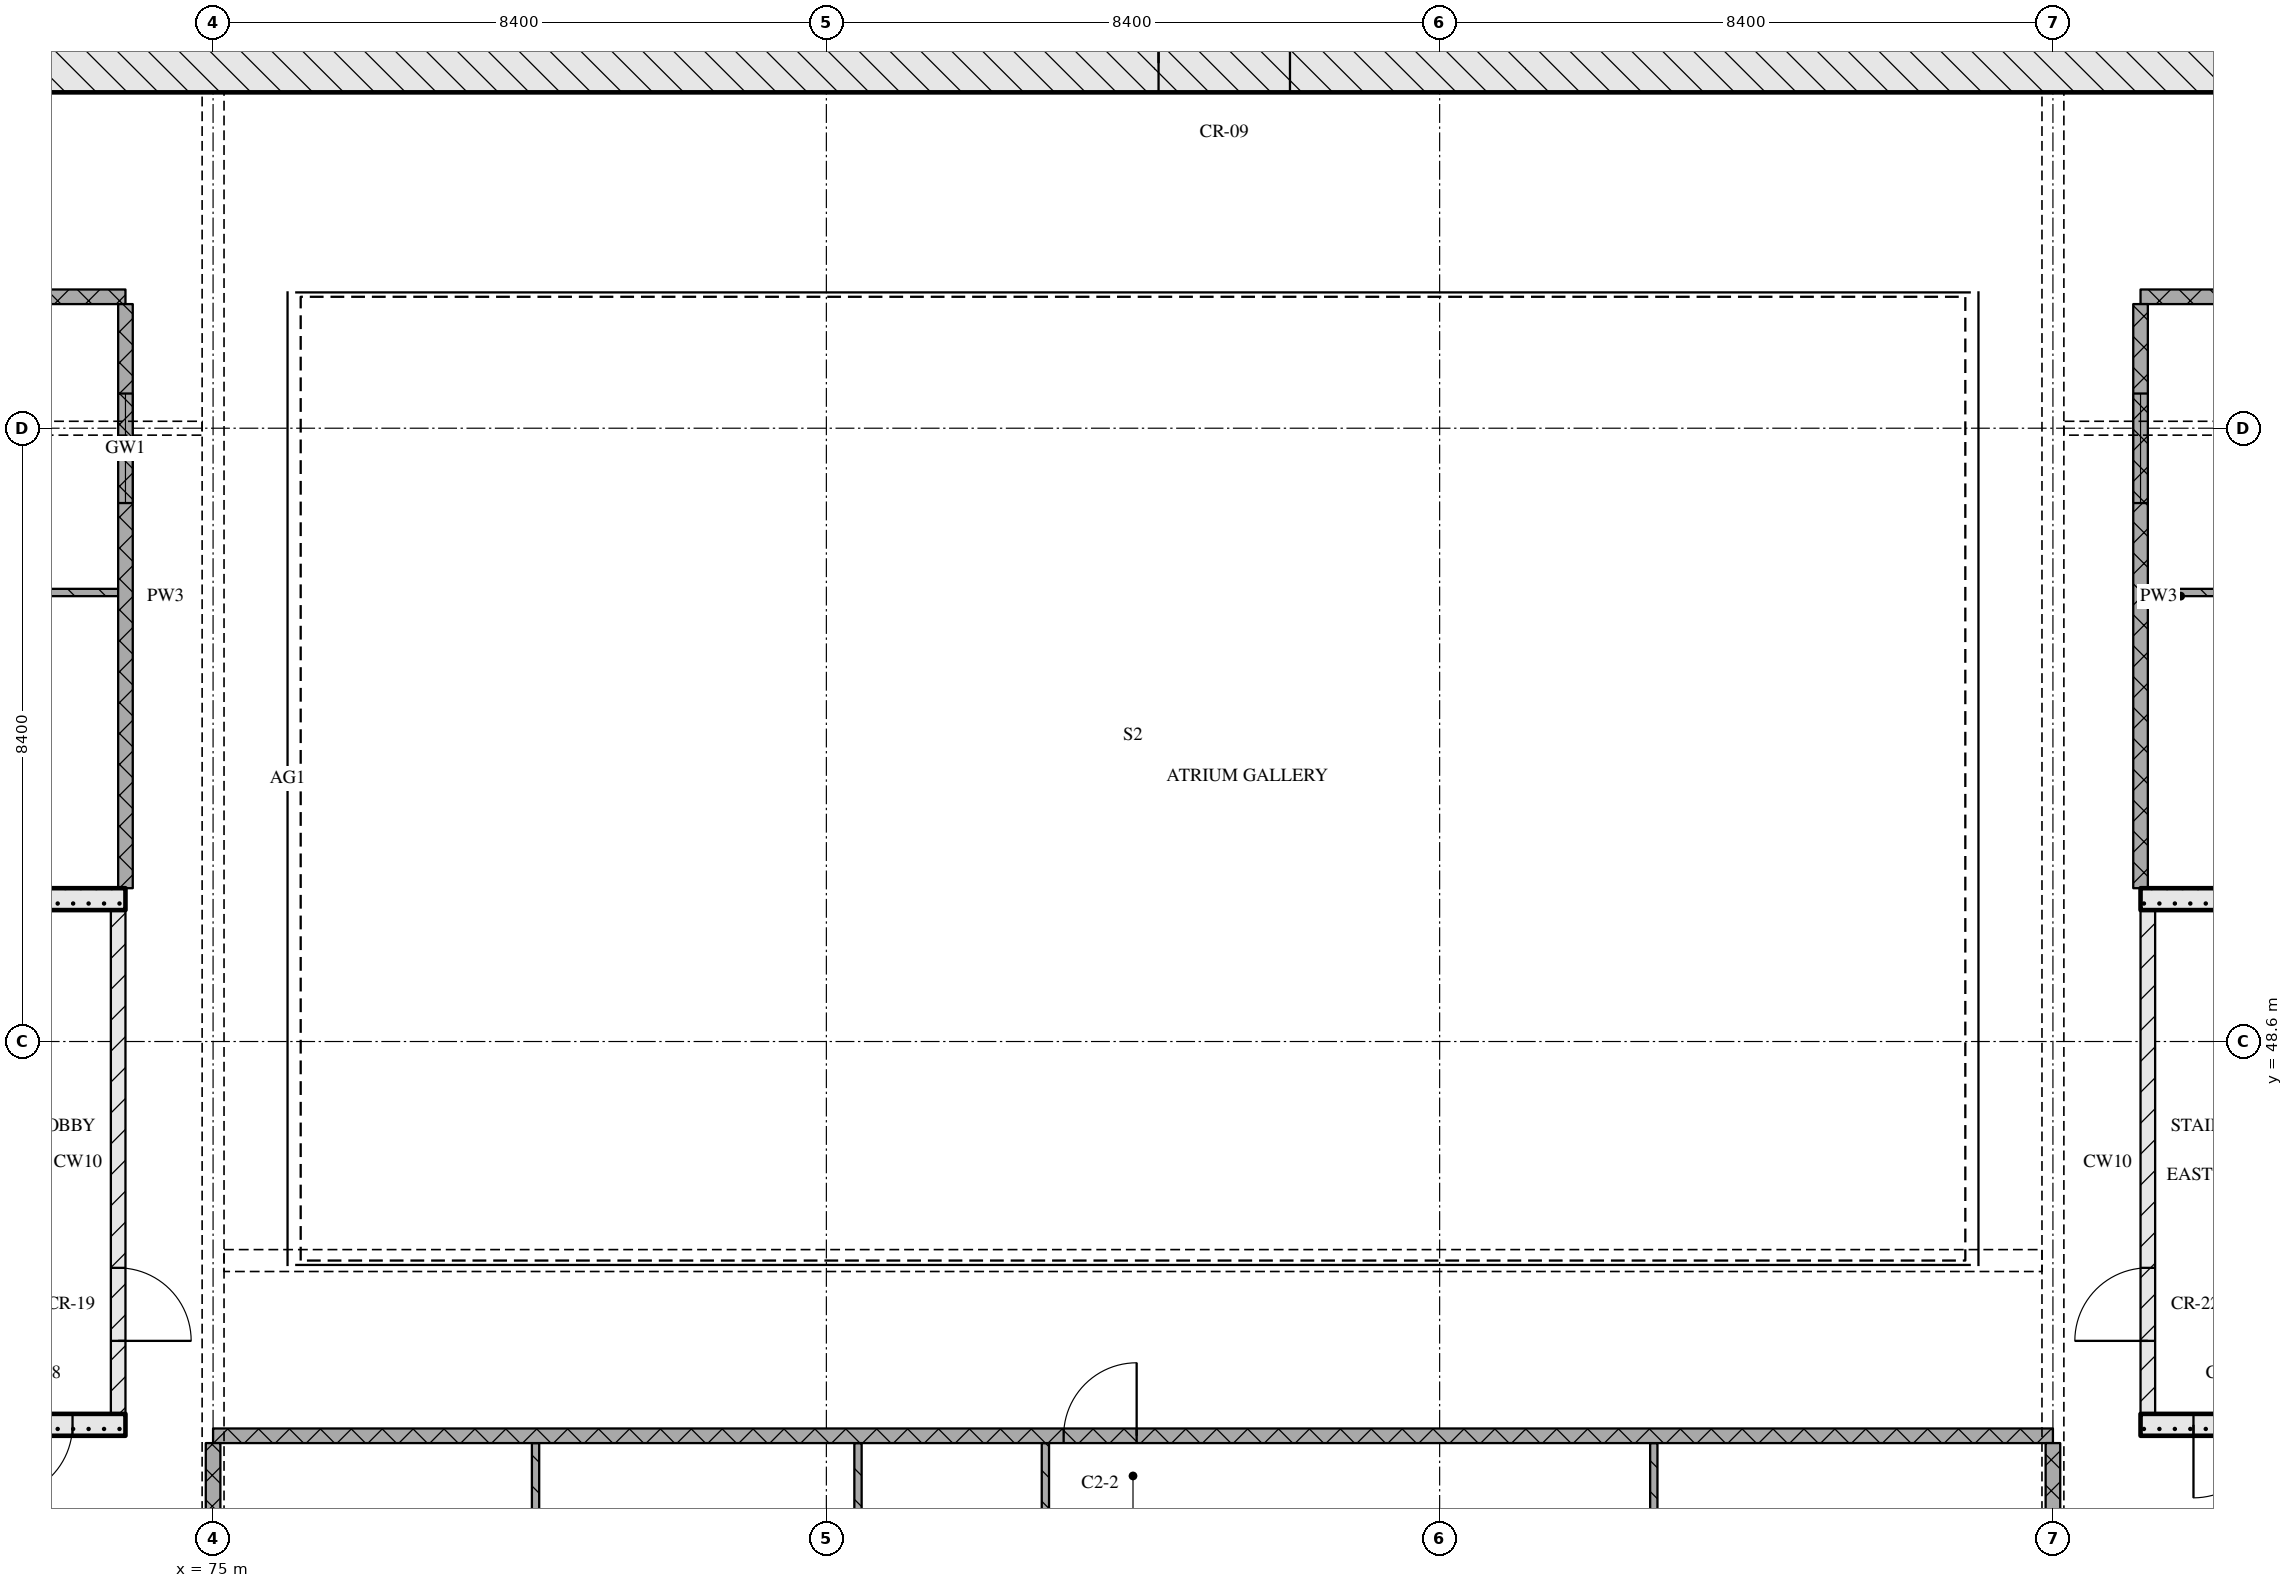
"""IFC4 building model, lengths in metres.
Left out: names, types, materials, properties, quantities, classifications, styles, units other than length and angle.
Written with IfcOpenShell. Run it as: python <this file> out.ifc"""

import sys

from ifc_helpers import new_model, si_unit, direction, frame, frame_2d, origin, place, context, subcontext, project, spatial, rectangle, extrude, element, fill, save


model = new_model("IFC4")
c1 = context("Model", 3, precision=1e-05, world=origin(), true_north=direction((0.0, 1.0)))
c2 = subcontext(c1, "Body", "Model", "MODEL_VIEW")
j1 = project(units=[si_unit("LENGTHUNIT", "METRE"), si_unit("PLANEANGLEUNIT", "RADIAN")], contexts=[c1])
p1 = place(None, origin())
s1 = spatial("IfcSite", under=j1, at=p1, CompositionType="ELEMENT")
p2 = place(p1, origin())
s2 = spatial("IfcBuilding", under=s1, at=p2, CompositionType="ELEMENT")
p3 = place(p2, frame((0.0, 0.0, 165.45)))
s3 = spatial("IfcBuildingStorey", under=s2, at=p3, CompositionType="ELEMENT", Elevation=165.45)
p4 = place(p3, frame((67.0, 62.0, 0.0), z_axis=(0.0, 0.0, 1.0), x_axis=(1.0, 0.0, 0.0)))
e1 = element("IfcWall", 1, at=p4, inside=s3, PredefinedType="SOLIDWALL", context=c2, shape_type="SweptSolid", body=[
    extrude(rectangle(XDim=41.2, YDim=0.8, at=frame_2d((20.6, 0.0))), origin(), (0.0, 0.0, 1.0), 3.32),
])
p5 = place(p4, frame((20.95, 0.0, 0.0)))
e2 = element("IfcOpeningElement", 2, at=p5, cuts=e1, PredefinedType="OPENING", context=c2, shape_type="SweptSolid", body=[
    extrude(rectangle(XDim=1.8, YDim=2.1, at=frame_2d((0.9, 1.05))), frame((0.0, 0.41, 0.0), z_axis=(0.0, -1.0, 0.0), x_axis=(1.0, 0.0, 0.0)), (0.0, 0.0, 1.0), 0.82),
])
p6 = place(p3, frame((68.2, 43.35, 0.0), z_axis=(0.0, 0.0, 1.0), x_axis=(1.0, 0.0, 0.0)))
e3 = element("IfcWall", 3, at=p6, inside=s3, PredefinedType="SOLIDWALL", context=c2, shape_type="SweptSolid", body=[
    extrude(rectangle(XDim=5.6, YDim=0.3, at=frame_2d((2.8, 0.0))), origin(), (0.0, 0.0, 1.0), 3.32),
])
p7 = place(p6, frame((3.875, 0.0, 0.0)))
e4 = element("IfcOpeningElement", 4, at=p7, cuts=e3, PredefinedType="OPENING", context=c2, shape_type="SweptSolid", body=[
    extrude(rectangle(XDim=1.0, YDim=2.1, at=frame_2d((0.5, 1.05))), frame((0.0, 0.16, 0.0), z_axis=(0.0, -1.0, 0.0), x_axis=(1.0, 0.0, 0.0)), (0.0, 0.0, 1.0), 0.32),
])
p8 = place(p3, frame((73.7, 43.5, 0.0), z_axis=(0.0, 0.0, 1.0), x_axis=(0.0, 1.0, 0.0)))
e5 = element("IfcWall", 5, at=p8, inside=s3, PredefinedType="PARTITIONING", context=c2, shape_type="SweptSolid", body=[
    extrude(rectangle(XDim=6.9, YDim=0.2, at=frame_2d((3.45, 0.0))), origin(), (0.0, 0.0, 1.0), 3.32),
])
p9 = place(p8, frame((1.0, 0.0, 0.0)))
e6 = element("IfcOpeningElement", 6, at=p9, cuts=e5, PredefinedType="OPENING", context=c2, shape_type="SweptSolid", body=[
    extrude(rectangle(XDim=1.0, YDim=2.1, at=frame_2d((0.5, 1.05))), frame((0.0, 0.11, 0.0), z_axis=(0.0, -1.0, 0.0), x_axis=(1.0, 0.0, 0.0)), (0.0, 0.0, 1.0), 0.22),
])
p10 = place(p3, frame((68.2, 50.55, 0.0), z_axis=(0.0, 0.0, 1.0), x_axis=(1.0, 0.0, 0.0)))
e7 = element("IfcWall", 7, at=p10, inside=s3, PredefinedType="SOLIDWALL", context=c2, shape_type="SweptSolid", body=[
    extrude(rectangle(XDim=5.6, YDim=0.3, at=frame_2d((2.8, 0.0))), origin(), (0.0, 0.0, 1.0), 3.32),
])
p11 = place(p3, frame((101.4, 43.35, 0.0), z_axis=(0.0, 0.0, 1.0), x_axis=(1.0, 0.0, 0.0)))
e8 = element("IfcWall", 8, at=p11, inside=s3, PredefinedType="SOLIDWALL", context=c2, shape_type="SweptSolid", body=[
    extrude(rectangle(XDim=5.6, YDim=0.3, at=frame_2d((2.8, 0.0))), origin(), (0.0, 0.0, 1.0), 3.32),
])
p12 = place(p11, frame((0.725, 0.0, 0.0)))
e9 = element("IfcOpeningElement", 9, at=p12, cuts=e8, PredefinedType="OPENING", context=c2, shape_type="SweptSolid", body=[
    extrude(rectangle(XDim=1.0, YDim=2.1, at=frame_2d((0.5, 1.05))), frame((0.0, 0.16, 0.0), z_axis=(0.0, -1.0, 0.0), x_axis=(1.0, 0.0, 0.0)), (0.0, 0.0, 1.0), 0.32),
])
p13 = place(p3, frame((101.5, 43.5, 0.0), z_axis=(0.0, 0.0, 1.0), x_axis=(0.0, 1.0, 0.0)))
e10 = element("IfcWall", 10, at=p13, inside=s3, PredefinedType="PARTITIONING", context=c2, shape_type="SweptSolid", body=[
    extrude(rectangle(XDim=6.9, YDim=0.2, at=frame_2d((3.45, 0.0))), origin(), (0.0, 0.0, 1.0), 3.32),
])
p14 = place(p13, frame((1.0, 0.0, 0.0)))
e11 = element("IfcOpeningElement", 11, at=p14, cuts=e10, PredefinedType="OPENING", context=c2, shape_type="SweptSolid", body=[
    extrude(rectangle(XDim=1.0, YDim=2.1, at=frame_2d((0.5, 1.05))), frame((0.0, 0.11, 0.0), z_axis=(0.0, -1.0, 0.0), x_axis=(1.0, 0.0, 0.0)), (0.0, 0.0, 1.0), 0.22),
])
p15 = place(p3, frame((101.4, 50.55, 0.0), z_axis=(0.0, 0.0, 1.0), x_axis=(1.0, 0.0, 0.0)))
e12 = element("IfcWall", 12, at=p15, inside=s3, PredefinedType="SOLIDWALL", context=c2, shape_type="SweptSolid", body=[
    extrude(rectangle(XDim=5.6, YDim=0.3, at=frame_2d((2.8, 0.0))), origin(), (0.0, 0.0, 1.0), 3.32),
])
p16 = place(p3, frame((100.2, 43.2, 0.0), z_axis=(0.0, 0.0, 1.0), x_axis=(-1.0, 0.0, 0.0)))
e13 = element("IfcWall", 13, at=p16, inside=s3, PredefinedType="PARTITIONING", context=c2, shape_type="SweptSolid", body=[
    extrude(rectangle(XDim=25.2, YDim=0.2, at=frame_2d((12.6, 0.0))), origin(), (0.0, 0.0, 1.0), 3.32),
])
p17 = place(p16, frame((12.55, 0.0, 0.0)))
e14 = element("IfcOpeningElement", 14, at=p17, cuts=e13, PredefinedType="OPENING", context=c2, shape_type="SweptSolid", body=[
    extrude(rectangle(XDim=1.0, YDim=2.1, at=frame_2d((0.5, 1.05))), frame((0.0, 0.11, 0.0), z_axis=(0.0, -1.0, 0.0), x_axis=(1.0, 0.0, 0.0)), (0.0, 0.0, 1.0), 0.22),
])
p18 = place(p3, frame((67.5, 54.75, 0.0), z_axis=(0.0, 0.0, 1.0), x_axis=(1.0, 0.0, 0.0)))
e15 = element("IfcWall", 15, at=p18, inside=s3, PredefinedType="PARTITIONING", context=c2, shape_type="SweptSolid", body=[
    extrude(rectangle(XDim=6.2, YDim=0.1, at=frame_2d((3.1, 0.0))), origin(), (0.0, 0.0, 1.0), 3.32),
])
p19 = place(p3, frame((101.5, 54.75, 0.0), z_axis=(0.0, 0.0, 1.0), x_axis=(1.0, 0.0, 0.0)))
e16 = element("IfcWall", 16, at=p19, inside=s3, PredefinedType="PARTITIONING", context=c2, shape_type="SweptSolid", body=[
    extrude(rectangle(XDim=4.4, YDim=0.1, at=frame_2d((2.2, 0.0))), origin(), (0.0, 0.0, 1.0), 3.32),
])
p20 = place(p19, frame((1.7, 0.0, 0.0)))
e17 = element("IfcOpeningElement", 17, at=p20, cuts=e16, PredefinedType="OPENING", context=c2, shape_type="SweptSolid", body=[
    extrude(rectangle(XDim=0.9, YDim=2.1, at=frame_2d((0.45, 1.05))), frame((0.0, 0.06, 0.0), z_axis=(0.0, -1.0, 0.0), x_axis=(1.0, 0.0, 0.0)), (0.0, 0.0, 1.0), 0.12),
])
for number, where, z_axis, x_axis in (
    (18, (63.0, 58.8, 0.0), (0.0, 0.0, 1.0), (1.0, 0.0, 0.0)),
    (19, (101.4, 58.8, 0.0), (0.0, 0.0, 1.0), (1.0, 0.0, 0.0)),
):
    element("IfcWall", number, at=place(p3, frame(where, z_axis=z_axis, x_axis=x_axis)), inside=s3, PredefinedType="PARTITIONING", context=c2, shape_type="SweptSolid", body=[
        extrude(rectangle(XDim=10.8, YDim=0.2, at=frame_2d((5.4, 0.0))), origin(), (0.0, 0.0, 1.0), 3.32),
    ])
p21 = place(p3, frame((73.8, 58.7, 0.0), z_axis=(0.0, 0.0, 1.0), x_axis=(0.0, -1.0, 0.0)))
e20 = element("IfcWall", 20, at=p21, inside=s3, PredefinedType="PARTITIONING", context=c2, shape_type="SweptSolid", body=[
    extrude(rectangle(XDim=8.0, YDim=0.2, at=frame_2d((4.0, 0.0))), origin(), (0.0, 0.0, 1.0), 3.32),
])
p22 = place(p21, frame((1.225, 0.0, 0.9)))
e21 = element("IfcOpeningElement", 21, at=p22, cuts=e20, PredefinedType="OPENING", context=c2, shape_type="SweptSolid", body=[
    extrude(rectangle(XDim=1.5, YDim=1.5, at=frame_2d((0.75, 0.75))), frame((0.0, 0.11, 0.0), z_axis=(0.0, -1.0, 0.0), x_axis=(1.0, 0.0, 0.0)), (0.0, 0.0, 1.0), 0.22),
])
p23 = place(p3, frame((75.0, 43.1, 0.0), z_axis=(0.0, 0.0, 1.0), x_axis=(0.0, -1.0, 0.0)))
e22 = element("IfcWall", 22, at=p23, inside=s3, PredefinedType="PARTITIONING", context=c2, shape_type="SweptSolid", body=[
    extrude(rectangle(XDim=2.2, YDim=0.2, at=frame_2d((1.1, 0.0))), origin(), (0.0, 0.0, 1.0), 2.43),
])
for number, where, z_axis, x_axis in (
    (23, (79.417, 43.1, 0.0), (0.0, 0.0, 1.0), (0.0, -1.0, 0.0)),
    (24, (83.833, 43.1, 0.0), (0.0, 0.0, 1.0), (0.0, -1.0, 0.0)),
    (25, (86.4, 43.1, 0.0), (0.0, 0.0, 1.0), (0.0, -1.0, 0.0)),
    (26, (94.733, 43.1, 0.0), (0.0, 0.0, 1.0), (0.0, -1.0, 0.0)),
):
    element("IfcWall", number, at=place(p3, frame(where, z_axis=z_axis, x_axis=x_axis)), inside=s3, PredefinedType="PARTITIONING", context=c2, shape_type="SweptSolid", body=[
        extrude(rectangle(XDim=5.85, YDim=0.1, at=frame_2d((2.925, 0.0))), origin(), (0.0, 0.0, 1.0), 3.32),
    ])
p24 = place(p3, frame((100.2, 43.1, 0.0), z_axis=(0.0, 0.0, 1.0), x_axis=(0.0, -1.0, 0.0)))
e27 = element("IfcWall", 27, at=p24, inside=s3, PredefinedType="PARTITIONING", context=c2, shape_type="SweptSolid", body=[
    extrude(rectangle(XDim=2.2, YDim=0.2, at=frame_2d((1.1, 0.0))), origin(), (0.0, 0.0, 1.0), 2.43),
])
p25 = place(p3, frame((101.4, 58.7, 0.0), z_axis=(0.0, 0.0, 1.0), x_axis=(0.0, -1.0, 0.0)))
e28 = element("IfcWall", 28, at=p25, inside=s3, PredefinedType="PARTITIONING", context=c2, shape_type="SweptSolid", body=[
    extrude(rectangle(XDim=8.0, YDim=0.2, at=frame_2d((4.0, 0.0))), origin(), (0.0, 0.0, 1.0), 3.32),
])
p26 = place(p25, frame((1.225, 0.0, 0.9)))
e29 = element("IfcOpeningElement", 29, at=p26, cuts=e28, PredefinedType="OPENING", context=c2, shape_type="SweptSolid", body=[
    extrude(rectangle(XDim=1.5, YDim=1.5, at=frame_2d((0.75, 0.75))), frame((0.0, 0.11, 0.0), z_axis=(0.0, -1.0, 0.0), x_axis=(1.0, 0.0, 0.0)), (0.0, 0.0, 1.0), 0.22),
])
p27 = place(p5, origin())
e30 = element("IfcDoor", 30, at=p27, inside=s3, OperationType="DOUBLE_DOOR_SINGLE_SWING", PredefinedType="DOOR", context=c2, shape_type="SweptSolid", body=[
    extrude(rectangle(XDim=1.8, YDim=2.1, at=frame_2d((0.9, 1.05))), frame((0.0, 0.025, 0.0), z_axis=(0.0, -1.0, 0.0), x_axis=(1.0, 0.0, 0.0)), (0.0, 0.0, 1.0), 0.05),
])
fill(e2, e30)
p28 = place(p7, origin())
e31 = element("IfcDoor", 31, at=p28, inside=s3, OperationType="SINGLE_SWING_RIGHT", PredefinedType="DOOR", context=c2, shape_type="SweptSolid", body=[
    extrude(rectangle(XDim=1.0, YDim=2.1, at=frame_2d((0.5, 1.05))), frame((0.0, 0.025, 0.0), z_axis=(0.0, -1.0, 0.0), x_axis=(1.0, 0.0, 0.0)), (0.0, 0.0, 1.0), 0.05),
])
fill(e4, e31)
p29 = place(p9, origin())
e32 = element("IfcDoor", 32, at=p29, inside=s3, OperationType="SINGLE_SWING_RIGHT", PredefinedType="DOOR", context=c2, shape_type="SweptSolid", body=[
    extrude(rectangle(XDim=1.0, YDim=2.1, at=frame_2d((0.5, 1.05))), frame((0.0, 0.025, 0.0), z_axis=(0.0, -1.0, 0.0), x_axis=(1.0, 0.0, 0.0)), (0.0, 0.0, 1.0), 0.05),
])
fill(e6, e32)
p30 = place(p12, origin())
e33 = element("IfcDoor", 33, at=p30, inside=s3, OperationType="SINGLE_SWING_RIGHT", PredefinedType="DOOR", context=c2, shape_type="SweptSolid", body=[
    extrude(rectangle(XDim=1.0, YDim=2.1, at=frame_2d((0.5, 1.05))), frame((0.0, 0.025, 0.0), z_axis=(0.0, -1.0, 0.0), x_axis=(1.0, 0.0, 0.0)), (0.0, 0.0, 1.0), 0.05),
])
fill(e9, e33)
p31 = place(p14, origin())
e34 = element("IfcDoor", 34, at=p31, inside=s3, OperationType="SINGLE_SWING_LEFT", PredefinedType="DOOR", context=c2, shape_type="SweptSolid", body=[
    extrude(rectangle(XDim=1.0, YDim=2.1, at=frame_2d((0.5, 1.05))), frame((0.0, 0.025, 0.0), z_axis=(0.0, -1.0, 0.0), x_axis=(1.0, 0.0, 0.0)), (0.0, 0.0, 1.0), 0.05),
])
fill(e11, e34)
p32 = place(p17, origin())
e35 = element("IfcDoor", 35, at=p32, inside=s3, OperationType="SINGLE_SWING_RIGHT", PredefinedType="DOOR", context=c2, shape_type="SweptSolid", body=[
    extrude(rectangle(XDim=1.0, YDim=2.1, at=frame_2d((0.5, 1.05))), frame((0.0, 0.025, 0.0), z_axis=(0.0, -1.0, 0.0), x_axis=(1.0, 0.0, 0.0)), (0.0, 0.0, 1.0), 0.05),
])
fill(e14, e35)
p33 = place(p22, origin())
e36 = element("IfcWindow", 36, at=p33, inside=s3, PartitioningType="SINGLE_PANEL", PredefinedType="WINDOW", context=c2, shape_type="SweptSolid", body=[
    extrude(rectangle(XDim=1.5, YDim=1.5, at=frame_2d((0.75, 0.75))), frame((0.0, 0.03, 0.0), z_axis=(0.0, -1.0, 0.0), x_axis=(1.0, 0.0, 0.0)), (0.0, 0.0, 1.0), 0.06),
])
fill(e21, e36)
p34 = place(p26, origin())
e37 = element("IfcWindow", 37, at=p34, inside=s3, PartitioningType="SINGLE_PANEL", PredefinedType="WINDOW", context=c2, shape_type="SweptSolid", body=[
    extrude(rectangle(XDim=1.5, YDim=1.5, at=frame_2d((0.75, 0.75))), frame((0.0, 0.03, 0.0), z_axis=(0.0, -1.0, 0.0), x_axis=(1.0, 0.0, 0.0)), (0.0, 0.0, 1.0), 0.06),
])
fill(e29, e37)
save(model, sys.argv[1])
